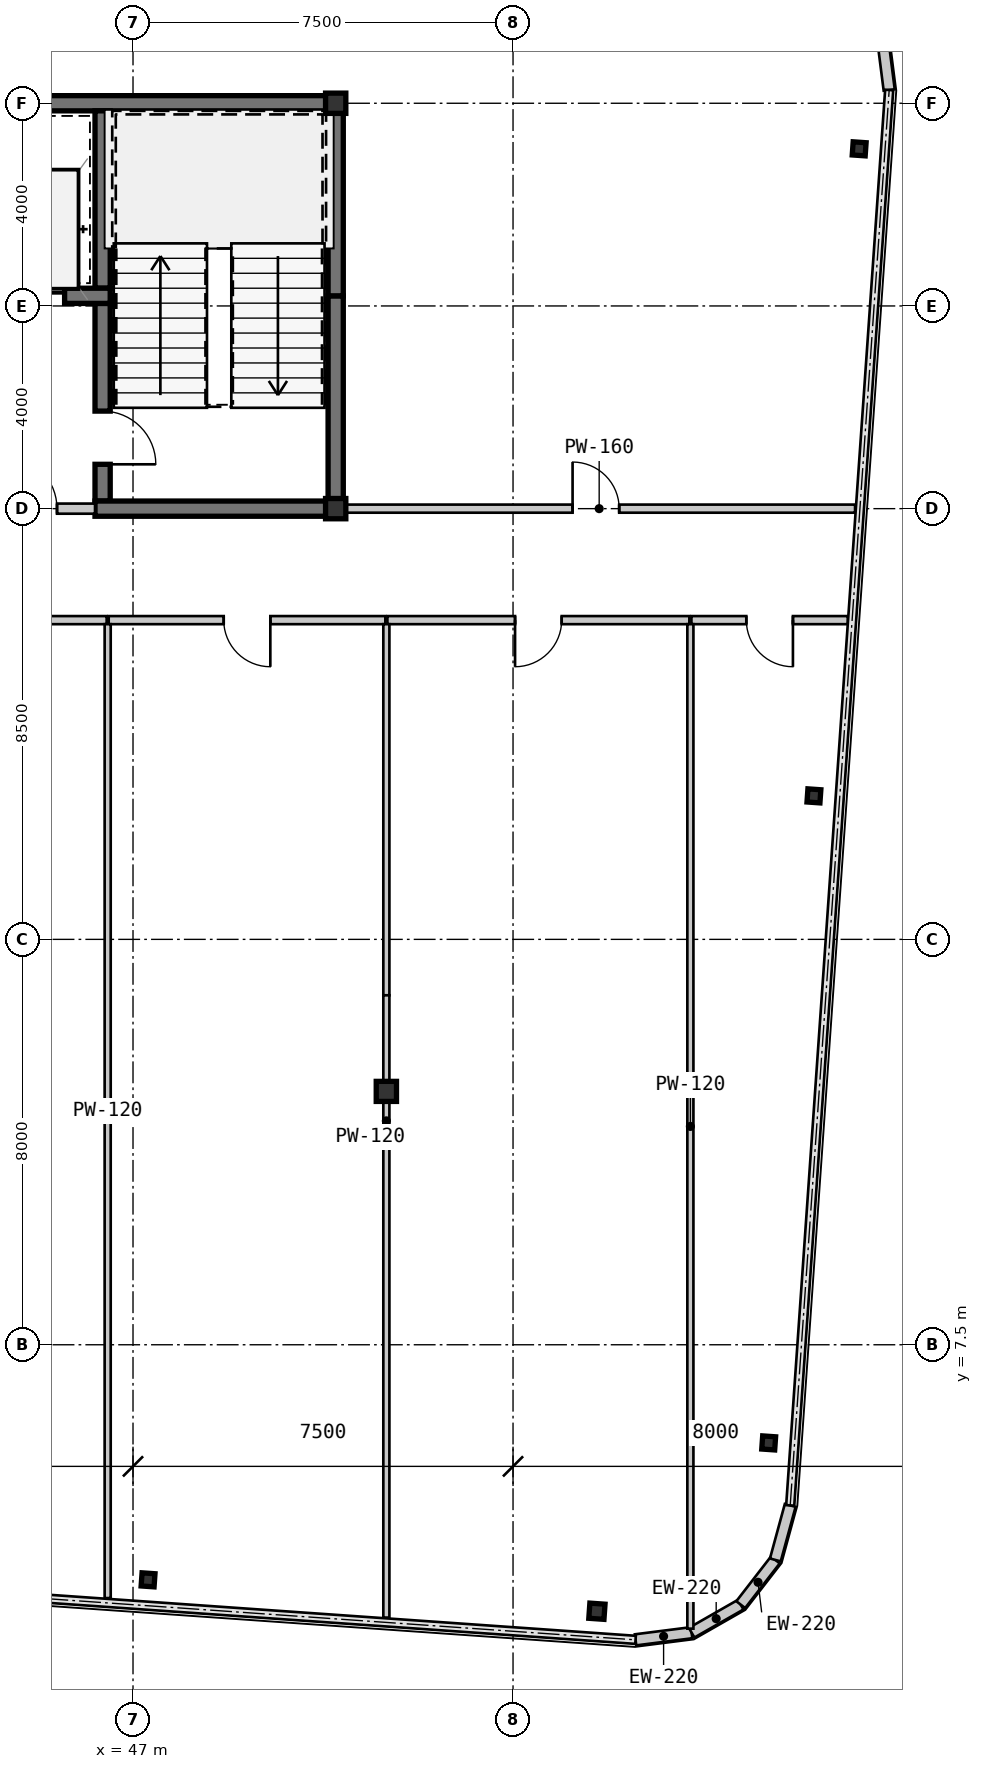
"""IFC4 building model, lengths in metres.
Left out: names, types, materials, properties, quantities, classifications, styles, units other than length and angle.
Written with IfcOpenShell. Run it as: python <this file> out.ifc"""

import sys

from ifc_helpers import new_model, si_unit, direction, frame, frame_2d, origin, origin_2d, place, context, subcontext, project, spatial, rectangle, hollow_rectangle, i_section, extrude, source, transform, mapped, element, fill, save


model = new_model("IFC4")
c1 = context("Model", 3, precision=1e-05, world=origin(), true_north=direction((0.0, 1.0)))
c2 = subcontext(c1, "Body", "Model", "MODEL_VIEW")
j1 = project(units=[si_unit("LENGTHUNIT", "METRE"), si_unit("PLANEANGLEUNIT", "RADIAN")], contexts=[c1])
p1 = place(None, origin())
s1 = spatial("IfcSite", under=j1, at=p1, CompositionType="ELEMENT")
p2 = place(p1, origin())
s2 = spatial("IfcBuilding", under=s1, at=p2, CompositionType="ELEMENT")
p3 = place(p2, frame((0.0, 0.0, 120.4)))
s3 = spatial("IfcBuildingStorey", under=s2, at=p3, CompositionType="ELEMENT", Elevation=120.4)
m1 = source(origin(), c2, "Body", "SweptSolid", [
    extrude(hollow_rectangle(XDim=0.4, YDim=0.4, WallThickness=0.016, at=origin_2d()), origin(), (0.0, 0.0, 1.0), 3.15),
])
for number, where, z_axis, x_axis in (
    (1, (51.0, 24.0, 0.0), (0.0, 0.0, 1.0), (1.0, 0.0, 0.0)),
    (2, (51.0, 32.0, 0.0), (0.0, 0.0, 1.0), (1.0, 0.0, 0.0)),
):
    element("IfcColumn", number, at=place(p3, frame(where, z_axis=z_axis, x_axis=x_axis)), inside=s3, PredefinedType="COLUMN", context=c2, shape_type="MappedRepresentation", body=[
        mapped(m1, transform((0.0, 0.0, 0.0), scale=1.0)),
    ])
m2 = source(origin(), c2, "Body", "SweptSolid", [
    extrude(i_section(OverallWidth=0.4, OverallDepth=0.396, WebThickness=0.022, FlangeThickness=0.034, at=origin_2d()), origin(), (0.0, 0.0, 1.0), 3.15),
])
p4 = place(p3, frame((52.0, 12.5, 0.0), z_axis=(0.0, 0.0, 1.0), x_axis=(1.0, 0.0, 0.0)))
e3 = element("IfcColumn", 3, at=p4, inside=s3, PredefinedType="COLUMN", context=c2, shape_type="MappedRepresentation", body=[
    mapped(m2, transform((0.0, 0.0, 0.0), scale=1.0)),
])
m3 = source(origin(), c2, "Body", "SweptSolid", [
    extrude(i_section(OverallWidth=0.256, OverallDepth=0.26, WebThickness=0.01, FlangeThickness=0.017, at=origin_2d()), origin(), (0.0, 0.0, 1.0), 3.15),
])
p5 = place(p3, frame((47.297, 2.861, 0.0), z_axis=(0.0, 0.0, 1.0), x_axis=(0.99756405026, -0.069756473744, 0.0)))
e4 = element("IfcColumn", 4, at=p5, inside=s3, PredefinedType="COLUMN", context=c2, shape_type="MappedRepresentation", body=[
    mapped(m3, transform((0.0, 0.0, 0.0), scale=1.0)),
])
m4 = source(origin(), c2, "Body", "SweptSolid", [
    extrude(hollow_rectangle(XDim=0.3, YDim=0.3, WallThickness=0.012, at=origin_2d()), origin(), (0.0, 0.0, 1.0), 3.15),
])
p6 = place(p3, frame((56.156, 2.241, 0.0), z_axis=(0.0, 0.0, 1.0), x_axis=(0.99756405026, -0.069756473744, 0.0)))
e5 = element("IfcColumn", 5, at=p6, inside=s3, PredefinedType="COLUMN", context=c2, shape_type="MappedRepresentation", body=[
    mapped(m4, transform((0.0, 0.0, 0.0), scale=1.0)),
])
for number, where, z_axis, x_axis in (
    (6, (59.545, 5.563, 0.0), (0.0, 0.0, 1.0), (0.998, -0.07, 0.0)),
    (7, (60.438, 18.332, 0.0), (0.0, 0.0, 1.0), (0.998, -0.07, 0.0)),
    (8, (61.331, 31.101, 0.0), (0.0, 0.0, 1.0), (0.998, -0.07, 0.0)),
):
    element("IfcColumn", number, at=place(p3, frame(where, z_axis=z_axis, x_axis=x_axis)), inside=s3, PredefinedType="COLUMN", context=c2, shape_type="MappedRepresentation", body=[
        mapped(m3, transform((0.0, 0.0, 0.0), scale=1.0)),
    ])
m5 = source(origin(), c2, "Body", "SweptSolid", [
    extrude(rectangle(XDim=1.116, YDim=0.22, at=frame_2d((0.558, 0.0))), origin(), (0.0, 0.0, 1.0), 2.93),
])
p7 = place(p3, frame((56.918, 1.677, 0.0), z_axis=(0.0, 0.0, 1.0), x_axis=(0.99202678349, 0.126027222605, 0.0)))
e9 = element("IfcWall", 9, at=p7, inside=s3, PredefinedType="SOLIDWALL", context=c2, shape_type="MappedRepresentation", body=[
    mapped(m5, transform((0.0, 0.0, 0.0), scale=1.0)),
])
m6 = source(origin(), c2, "Body", "SweptSolid", [
    extrude(rectangle(XDim=1.116, YDim=0.22, at=frame_2d((0.558, 0.0))), origin(), (0.0, 0.0, 1.0), 2.93),
])
for number, where, z_axis, x_axis in (
    (10, (58.025, 1.817, 0.0), (0.0, 0.0, 1.0), (0.868, 0.496, 0.0)),
    (11, (58.994, 2.371, 0.0), (0.0, 0.0, 1.0), (0.612, 0.791, 0.0)),
    (12, (59.677, 3.254, 0.0), (0.0, 0.0, 1.0), (0.263, 0.965, 0.0)),
    (13, (61.924, 32.262, 0.0), (0.0, 0.0, 1.0), (-0.126, 0.992, 0.0)),
):
    element("IfcWall", number, at=place(p3, frame(where, z_axis=z_axis, x_axis=x_axis)), inside=s3, PredefinedType="SOLIDWALL", context=c2, shape_type="MappedRepresentation", body=[
        mapped(m6, transform((0.0, 0.0, 0.0), scale=1.0)),
    ])
m7 = source(origin(), c2, "Body", "SweptSolid", [
    extrude(rectangle(XDim=11.95, YDim=0.3, at=frame_2d((5.975, 0.0))), origin(), (0.0, 0.0, 1.0), 2.93),
])
p8 = place(p3, frame((39.2, 32.0, 0.0), z_axis=(0.0, 0.0, 1.0), x_axis=(1.0, 0.0, 0.0)))
e14 = element("IfcWall", 14, at=p8, inside=s3, PredefinedType="SHEAR", context=c2, shape_type="MappedRepresentation", body=[
    mapped(m7, transform((0.0, 0.0, 0.0), scale=1.0)),
])
m8 = source(origin(), c2, "Body", "SweptSolid", [
    extrude(rectangle(XDim=4.05, YDim=0.3, at=frame_2d((2.025, 0.0))), origin(), (0.0, 0.0, 1.0), 2.93),
])
p9 = place(p3, frame((51.0, 24.15, 0.0), z_axis=(0.0, 0.0, 1.0), x_axis=(0.0, 1.0, 0.0)))
e15 = element("IfcWall", 15, at=p9, inside=s3, PredefinedType="SHEAR", context=c2, shape_type="MappedRepresentation", body=[
    mapped(m8, transform((0.0, 0.0, 0.0), scale=1.0)),
])
m9 = source(origin(), c2, "Body", "SweptSolid", [
    extrude(rectangle(XDim=3.65, YDim=0.3, at=frame_2d((1.825, 0.0))), origin(), (0.0, 0.0, 1.0), 2.93),
])
p10 = place(p3, frame((51.0, 28.2, 0.0), z_axis=(0.0, 0.0, 1.0), x_axis=(0.0, 1.0, 0.0)))
e16 = element("IfcWall", 16, at=p10, inside=s3, PredefinedType="SHEAR", context=c2, shape_type="MappedRepresentation", body=[
    mapped(m9, transform((0.0, 0.0, 0.0), scale=1.0)),
])
m10 = source(origin(), c2, "Body", "SweptSolid", [
    extrude(rectangle(XDim=3.5, YDim=0.3, at=frame_2d((1.75, 0.0))), origin(), (0.0, 0.0, 1.0), 2.93),
])
p11 = place(p3, frame((46.4, 31.85, 0.0), z_axis=(0.0, 0.0, 1.0), x_axis=(0.0, -1.0, 0.0)))
e17 = element("IfcWall", 17, at=p11, inside=s3, PredefinedType="SHEAR", context=c2, shape_type="MappedRepresentation", body=[
    mapped(m10, transform((0.0, 0.0, 0.0), scale=1.0)),
])
m11 = source(origin(), c2, "Body", "SweptSolid", [
    extrude(rectangle(XDim=3.9, YDim=0.3, at=frame_2d((1.95, 0.0))), origin(), (0.0, 0.0, 1.0), 2.93),
])
p12 = place(p3, frame((46.4, 28.05, 0.0), z_axis=(0.0, 0.0, 1.0), x_axis=(0.0, -1.0, 0.0)))
e18 = element("IfcWall", 18, at=p12, inside=s3, PredefinedType="SHEAR", context=c2, shape_type="MappedRepresentation", body=[
    mapped(m11, transform((0.0, 0.0, 0.0), scale=1.0)),
])
m12 = source(origin(), c2, "Body", "SweptSolid", [
    extrude(rectangle(XDim=1.05, YDim=2.1, at=frame_2d((0.525, 1.05))), frame((0.0, 0.16, 0.0), z_axis=(0.0, -1.0, 0.0), x_axis=(1.0, 0.0, 0.0)), (0.0, 0.0, 1.0), 0.32),
])
p13 = place(p12, frame((2.125, 0.0, 0.0)))
e19 = element("IfcOpeningElement", 19, at=p13, cuts=e18, PredefinedType="OPENING", context=c2, shape_type="MappedRepresentation", body=[
    mapped(m12, transform((0.0, 0.0, 0.0), scale=1.0)),
])
m13 = source(origin(), c2, "Body", "SweptSolid", [
    extrude(rectangle(XDim=4.9, YDim=0.3, at=frame_2d((2.45, 0.0))), origin(), (0.0, 0.0, 1.0), 2.93),
])
p14 = place(p3, frame((46.25, 24.0, 0.0), z_axis=(0.0, 0.0, 1.0), x_axis=(1.0, 0.0, 0.0)))
e20 = element("IfcWall", 20, at=p14, inside=s3, PredefinedType="SHEAR", context=c2, shape_type="MappedRepresentation", body=[
    mapped(m13, transform((0.0, 0.0, 0.0), scale=1.0)),
])
m14 = source(origin(), c2, "Body", "SweptSolid", [
    extrude(rectangle(XDim=2.9, YDim=0.3, at=frame_2d((1.45, 0.0))), origin(), (0.0, 0.0, 1.0), 2.93),
])
p15 = place(p3, frame((43.65, 28.2, 0.0), z_axis=(0.0, 0.0, 1.0), x_axis=(1.0, 0.0, 0.0)))
e21 = element("IfcWall", 21, at=p15, inside=s3, PredefinedType="SHEAR", context=c2, shape_type="MappedRepresentation", body=[
    mapped(m14, transform((0.0, 0.0, 0.0), scale=1.0)),
])
m15 = source(origin(), c2, "Body", "SweptSolid", [
    extrude(rectangle(XDim=1.1, YDim=2.15, at=frame_2d((0.55, 1.075))), frame((0.0, 0.16, 0.0), z_axis=(0.0, -1.0, 0.0), x_axis=(1.0, 0.0, 0.0)), (0.0, 0.0, 1.0), 0.32),
])
p16 = place(p15, frame((0.9, 0.0, 0.0)))
e22 = element("IfcOpeningElement", 22, at=p16, cuts=e21, PredefinedType="OPENING", context=c2, shape_type="MappedRepresentation", body=[
    mapped(m15, transform((0.0, 0.0, 0.0), scale=1.0)),
])
m16 = source(origin(), c2, "Body", "SweptSolid", [
    extrude(rectangle(XDim=2.7, YDim=0.2, at=frame_2d((1.35, 0.0))), origin(), (0.0, 0.0, 1.0), 2.397),
])
p17 = place(p3, frame((43.55, 24.0, 0.0), z_axis=(0.0, 0.0, 1.0), x_axis=(1.0, 0.0, 0.0)))
e23 = element("IfcWall", 23, at=p17, inside=s3, PredefinedType="SOLIDWALL", context=c2, shape_type="MappedRepresentation", body=[
    mapped(m16, transform((0.0, 0.0, 0.0), scale=1.0)),
])
m17 = source(origin(), c2, "Body", "SweptSolid", [
    extrude(rectangle(XDim=1.05, YDim=2.1, at=frame_2d((0.525, 1.05))), frame((0.0, 0.11, 0.0), z_axis=(0.0, -1.0, 0.0), x_axis=(1.0, 0.0, 0.0)), (0.0, 0.0, 1.0), 0.22),
])
p18 = place(p17, frame((0.9, 0.0, 0.0)))
e24 = element("IfcOpeningElement", 24, at=p18, cuts=e23, PredefinedType="OPENING", context=c2, shape_type="MappedRepresentation", body=[
    mapped(m17, transform((0.0, 0.0, 0.0), scale=1.0)),
])
m18 = source(origin(), c2, "Body", "SweptSolid", [
    extrude(rectangle(XDim=5.459, YDim=0.16, at=frame_2d((2.73, 0.0))), origin(), (0.0, 0.0, 1.0), 2.93),
])
p19 = place(p3, frame((46.48, 21.8, 0.0), z_axis=(0.0, 0.0, 1.0), x_axis=(-1.0, 0.0, 0.0)))
e25 = element("IfcWall", 25, at=p19, inside=s3, PredefinedType="PARTITIONING", context=c2, shape_type="MappedRepresentation", body=[
    mapped(m18, transform((0.0, 0.0, 0.0), scale=1.0)),
])
m19 = source(origin(), c2, "Body", "SweptSolid", [
    extrude(rectangle(XDim=0.92, YDim=2.1, at=frame_2d((0.46, 1.05))), frame((0.0, 0.09, 0.0), z_axis=(0.0, -1.0, 0.0), x_axis=(1.0, 0.0, 0.0)), (0.0, 0.0, 1.0), 0.18),
])
p20 = place(p19, frame((2.27, 0.0, 0.0)))
e26 = element("IfcOpeningElement", 26, at=p20, cuts=e25, PredefinedType="OPENING", context=c2, shape_type="MappedRepresentation", body=[
    mapped(m19, transform((0.0, 0.0, 0.0), scale=1.0)),
])
p21 = place(p3, frame((51.98, 21.8, 0.0), z_axis=(0.0, 0.0, 1.0), x_axis=(-1.0, 0.0, 0.0)))
e27 = element("IfcWall", 27, at=p21, inside=s3, PredefinedType="PARTITIONING", context=c2, shape_type="MappedRepresentation", body=[
    mapped(m18, transform((0.0, 0.0, 0.0), scale=1.0)),
])
p22 = place(p21, frame((2.27, 0.0, 0.0)))
e28 = element("IfcOpeningElement", 28, at=p22, cuts=e27, PredefinedType="OPENING", context=c2, shape_type="MappedRepresentation", body=[
    mapped(m19, transform((0.0, 0.0, 0.0), scale=1.0)),
])
m20 = source(origin(), c2, "Body", "SweptSolid", [
    extrude(rectangle(XDim=5.959, YDim=0.16, at=frame_2d((2.98, 0.0))), origin(), (0.0, 0.0, 1.0), 2.93),
])
p23 = place(p3, frame((57.98, 21.8, 0.0), z_axis=(0.0, 0.0, 1.0), x_axis=(-1.0, 0.0, 0.0)))
e29 = element("IfcWall", 29, at=p23, inside=s3, PredefinedType="PARTITIONING", context=c2, shape_type="MappedRepresentation", body=[
    mapped(m20, transform((0.0, 0.0, 0.0), scale=1.0)),
])
p24 = place(p23, frame((2.52, 0.0, 0.0)))
e30 = element("IfcOpeningElement", 30, at=p24, cuts=e29, PredefinedType="OPENING", context=c2, shape_type="MappedRepresentation", body=[
    mapped(m19, transform((0.0, 0.0, 0.0), scale=1.0)),
])
m21 = source(origin(), c2, "Body", "SweptSolid", [
    extrude(rectangle(XDim=3.087, YDim=0.16, at=frame_2d((1.543, 0.0))), origin(), (0.0, 0.0, 1.0), 2.93),
])
p25 = place(p3, frame((61.107, 21.8, 0.0), z_axis=(0.0, 0.0, 1.0), x_axis=(-1.0, 0.0, 0.0)))
e31 = element("IfcWall", 31, at=p25, inside=s3, PredefinedType="PARTITIONING", context=c2, shape_type="MappedRepresentation", body=[
    mapped(m21, transform((0.0, 0.0, 0.0), scale=1.0)),
])
p26 = place(p25, frame((1.083, 0.0, 0.0)))
e32 = element("IfcOpeningElement", 32, at=p26, cuts=e31, PredefinedType="OPENING", context=c2, shape_type="MappedRepresentation", body=[
    mapped(m19, transform((0.0, 0.0, 0.0), scale=1.0)),
])
m22 = source(origin(), c2, "Body", "SweptSolid", [
    extrude(rectangle(XDim=10.1, YDim=0.16, at=frame_2d((5.05, 0.0))), origin(), (0.0, 0.0, 1.0), 2.93),
])
p27 = place(p3, frame((51.15, 24.0, 0.0), z_axis=(0.0, 0.0, 1.0), x_axis=(1.0, 0.0, 0.0)))
e33 = element("IfcWall", 33, at=p27, inside=s3, PredefinedType="PARTITIONING", context=c2, shape_type="MappedRepresentation", body=[
    mapped(m22, transform((0.0, 0.0, 0.0), scale=1.0)),
])
p28 = place(p27, frame((4.525, 0.0, 0.0)))
e34 = element("IfcOpeningElement", 34, at=p28, cuts=e33, PredefinedType="OPENING", context=c2, shape_type="MappedRepresentation", body=[
    mapped(m19, transform((0.0, 0.0, 0.0), scale=1.0)),
])
m23 = source(origin(), c2, "Body", "SweptSolid", [
    extrude(rectangle(XDim=19.219, YDim=0.12, at=frame_2d((9.609, 0.0))), origin(), (0.0, 0.0, 1.0), 2.93),
])
p29 = place(p3, frame((46.5, 21.72, 0.0), z_axis=(0.0, 0.0, 1.0), x_axis=(0.0, -1.0, 0.0)))
e35 = element("IfcWall", 35, at=p29, inside=s3, PredefinedType="PARTITIONING", context=c2, shape_type="MappedRepresentation", body=[
    mapped(m23, transform((0.0, 0.0, 0.0), scale=1.0)),
])
m24 = source(origin(), c2, "Body", "SweptSolid", [
    extrude(rectangle(XDim=7.324, YDim=0.12, at=frame_2d((3.662, 0.0))), origin(), (0.0, 0.0, 1.0), 2.93),
])
p30 = place(p3, frame((52.0, 21.72, 0.0), z_axis=(0.0, 0.0, 1.0), x_axis=(0.0, -1.0, 0.0)))
e36 = element("IfcWall", 36, at=p30, inside=s3, PredefinedType="PARTITIONING", context=c2, shape_type="MappedRepresentation", body=[
    mapped(m24, transform((0.0, 0.0, 0.0), scale=1.0)),
])
m25 = source(origin(), c2, "Body", "SweptSolid", [
    extrude(rectangle(XDim=1.901, YDim=0.12, at=frame_2d((0.951, 0.0))), origin(), (0.0, 0.0, 1.0), 2.397),
])
p31 = place(p3, frame((52.0, 14.396, 0.0), z_axis=(0.0, 0.0, 1.0), x_axis=(0.0, -1.0, 0.0)))
e37 = element("IfcWall", 37, at=p31, inside=s3, PredefinedType="PARTITIONING", context=c2, shape_type="MappedRepresentation", body=[
    mapped(m25, transform((0.0, 0.0, 0.0), scale=1.0)),
])
m26 = source(origin(), c2, "Body", "SweptSolid", [
    extrude(rectangle(XDim=10.378, YDim=0.12, at=frame_2d((5.189, 0.0))), origin(), (0.0, 0.0, 1.0), 2.93),
])
p32 = place(p3, frame((52.0, 12.495, 0.0), z_axis=(0.0, 0.0, 1.0), x_axis=(0.0, -1.0, 0.0)))
e38 = element("IfcWall", 38, at=p32, inside=s3, PredefinedType="PARTITIONING", context=c2, shape_type="MappedRepresentation", body=[
    mapped(m26, transform((0.0, 0.0, 0.0), scale=1.0)),
])
m27 = source(origin(), c2, "Body", "SweptSolid", [
    extrude(rectangle(XDim=19.822, YDim=0.12, at=frame_2d((9.911, 0.0))), origin(), (0.0, 0.0, 1.0), 2.93),
])
p33 = place(p3, frame((58.0, 21.72, 0.0), z_axis=(0.0, 0.0, 1.0), x_axis=(0.0, -1.0, 0.0)))
e39 = element("IfcWall", 39, at=p33, inside=s3, PredefinedType="PARTITIONING", context=c2, shape_type="MappedRepresentation", body=[
    mapped(m27, transform((0.0, 0.0, 0.0), scale=1.0)),
])
m28 = source(origin(), c2, "Body", "SweptSolid", [
    extrude(rectangle(XDim=1.05, YDim=2.1, at=frame_2d((0.525, 1.05))), frame((0.0, 0.025, 0.0), z_axis=(0.0, -1.0, 0.0), x_axis=(1.0, 0.0, 0.0)), (0.0, 0.0, 1.0), 0.05),
])
p34 = place(p13, origin())
e40 = element("IfcDoor", 40, at=p34, inside=s3, OperationType="SINGLE_SWING_RIGHT", PredefinedType="DOOR", context=c2, shape_type="MappedRepresentation", body=[
    mapped(m28, transform((0.0, 0.0, 0.0), scale=1.0)),
])
fill(e19, e40)
m29 = source(origin(), c2, "Body", "SweptSolid", [
    extrude(rectangle(XDim=1.1, YDim=2.15, at=frame_2d((0.55, 1.075))), frame((0.0, 0.025, 0.0), z_axis=(0.0, -1.0, 0.0), x_axis=(1.0, 0.0, 0.0)), (0.0, 0.0, 1.0), 0.05),
])
p35 = place(p16, origin())
e41 = element("IfcDoor", 41, at=p35, inside=s3, OperationType="SLIDING_TO_LEFT", PredefinedType="DOOR", context=c2, shape_type="MappedRepresentation", body=[
    mapped(m29, transform((0.0, 0.0, 0.0), scale=1.0)),
])
fill(e22, e41)
p36 = place(p18, origin())
e42 = element("IfcDoor", 42, at=p36, inside=s3, OperationType="SINGLE_SWING_LEFT", PredefinedType="DOOR", context=c2, shape_type="MappedRepresentation", body=[
    mapped(m28, transform((0.0, 0.0, 0.0), scale=1.0)),
])
fill(e24, e42)
m30 = source(origin(), c2, "Body", "SweptSolid", [
    extrude(rectangle(XDim=0.92, YDim=2.1, at=frame_2d((0.46, 1.05))), frame((0.0, 0.025, 0.0), z_axis=(0.0, -1.0, 0.0), x_axis=(1.0, 0.0, 0.0)), (0.0, 0.0, 1.0), 0.05),
])
p37 = place(p22, origin())
e43 = element("IfcDoor", 43, at=p37, inside=s3, OperationType="SINGLE_SWING_LEFT", PredefinedType="DOOR", context=c2, shape_type="MappedRepresentation", body=[
    mapped(m30, transform((0.0, 0.0, 0.0), scale=1.0)),
])
fill(e28, e43)
p38 = place(p24, origin())
e44 = element("IfcDoor", 44, at=p38, inside=s3, OperationType="SINGLE_SWING_RIGHT", PredefinedType="DOOR", context=c2, shape_type="MappedRepresentation", body=[
    mapped(m30, transform((0.0, 0.0, 0.0), scale=1.0)),
])
fill(e30, e44)
p39 = place(p26, origin())
e45 = element("IfcDoor", 45, at=p39, inside=s3, OperationType="SINGLE_SWING_LEFT", PredefinedType="DOOR", context=c2, shape_type="MappedRepresentation", body=[
    mapped(m30, transform((0.0, 0.0, 0.0), scale=1.0)),
])
fill(e32, e45)
p40 = place(p28, origin())
e46 = element("IfcDoor", 46, at=p40, inside=s3, OperationType="SINGLE_SWING_LEFT", PredefinedType="DOOR", context=c2, shape_type="MappedRepresentation", body=[
    mapped(m30, transform((0.0, 0.0, 0.0), scale=1.0)),
])
fill(e34, e46)
save(model, sys.argv[1])
